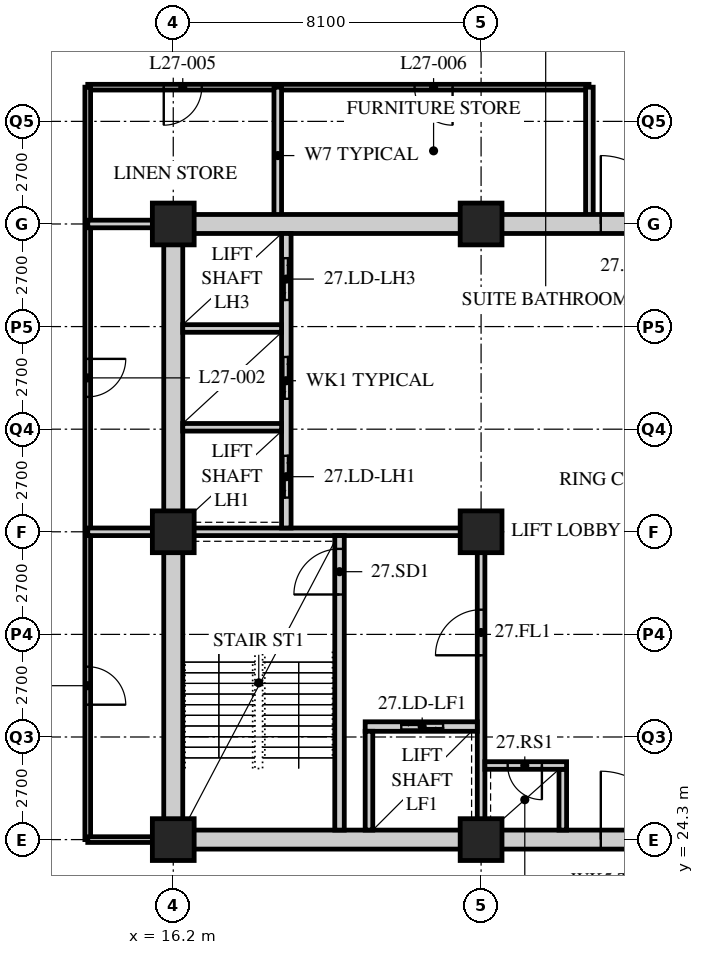
"""IFC4 building model, lengths in metres.
Left out: names, types, materials, properties, quantities, classifications, styles, units other than length and angle.
Written with IfcOpenShell. Run it as: python <this file> out.ifc"""

import sys

from ifc_helpers import new_model, si_unit, direction, frame, frame_2d, origin, origin_2d, place, context, subcontext, project, spatial, rectangle, hollow_rectangle, extrude, element, fill, save


model = new_model("IFC4")
c1 = context("Model", 3, precision=1e-05, world=origin(), true_north=direction((0.0, 1.0)))
c2 = subcontext(c1, "Body", "Model", "MODEL_VIEW")
j1 = project(units=[si_unit("LENGTHUNIT", "METRE"), si_unit("PLANEANGLEUNIT", "RADIAN")], contexts=[c1])
p1 = place(None, origin())
s1 = spatial("IfcSite", under=j1, at=p1, CompositionType="ELEMENT")
p2 = place(p1, origin())
s2 = spatial("IfcBuilding", under=s1, at=p2, CompositionType="ELEMENT")
p3 = place(p2, frame((0.0, 0.0, 110.2)))
s3 = spatial("IfcBuildingStorey", under=s2, at=p3, CompositionType="ELEMENT", Elevation=110.2)
for number, where, z_axis, x_axis in (
    (1, (16.2, 24.3, 0.0), (0.0, 0.0, 1.0), (1.0, 0.0, 0.0)),
    (2, (16.2, 32.4, 0.0), (0.0, 0.0, 1.0), (1.0, 0.0, 0.0)),
    (3, (16.2, 40.5, 0.0), (0.0, 0.0, 1.0), (1.0, 0.0, 0.0)),
    (4, (24.3, 24.3, 0.0), (0.0, 0.0, 1.0), (1.0, 0.0, 0.0)),
    (5, (24.3, 32.4, 0.0), (0.0, 0.0, 1.0), (1.0, 0.0, 0.0)),
    (6, (24.3, 40.5, 0.0), (0.0, 0.0, 1.0), (1.0, 0.0, 0.0)),
):
    element("IfcColumn", number, at=place(p3, frame(where, z_axis=z_axis, x_axis=x_axis)), inside=s3, PredefinedType="COLUMN", context=c2, shape_type="SweptSolid", body=[
        extrude(hollow_rectangle(XDim=1.1, YDim=1.1, WallThickness=0.1, at=origin_2d()), origin(), (0.0, 0.0, 1.0), 3.4),
    ])
p4 = place(p3, frame((27.14, 44.1, 0.0), z_axis=(0.0, 0.0, 1.0), x_axis=(-1.0, 0.0, 0.0)))
e7 = element("IfcWall", 7, at=p4, inside=s3, PredefinedType="PARTITIONING", context=c2, shape_type="SweptSolid", body=[
    extrude(rectangle(XDim=13.19, YDim=0.15, at=frame_2d((6.595, 0.0))), origin(), (0.0, 0.0, 1.0), 3.19),
])
p5 = place(p4, frame((10.19, 0.0, 0.0)))
e8 = element("IfcOpeningElement", 8, at=p5, cuts=e7, PredefinedType="OPENING", context=c2, shape_type="SweptSolid", body=[
    extrude(rectangle(XDim=1.0, YDim=2.1, at=frame_2d((0.5, 1.05))), frame((0.0, 0.085, 0.0), z_axis=(0.0, -1.0, 0.0), x_axis=(1.0, 0.0, 0.0)), (0.0, 0.0, 1.0), 0.17),
])
p6 = place(p4, frame((3.59, 0.0, 0.0)))
e9 = element("IfcOpeningElement", 9, at=p6, cuts=e7, PredefinedType="OPENING", context=c2, shape_type="SweptSolid", body=[
    extrude(rectangle(XDim=1.0, YDim=2.1, at=frame_2d((0.5, 1.05))), frame((0.0, 0.085, 0.0), z_axis=(0.0, -1.0, 0.0), x_axis=(1.0, 0.0, 0.0)), (0.0, 0.0, 1.0), 0.17),
])
p7 = place(p3, frame((13.95, 44.1, 0.0), z_axis=(0.0, 0.0, 1.0), x_axis=(0.0, -1.0, 0.0)))
e10 = element("IfcWall", 10, at=p7, inside=s3, PredefinedType="PARTITIONING", context=c2, shape_type="SweptSolid", body=[
    extrude(rectangle(XDim=19.8, YDim=0.15, at=frame_2d((9.9, 0.0))), origin(), (0.0, 0.0, 1.0), 3.19),
])
p8 = place(p7, frame((15.25, 0.0, 0.0)))
e11 = element("IfcOpeningElement", 11, at=p8, cuts=e10, PredefinedType="OPENING", context=c2, shape_type="SweptSolid", body=[
    extrude(rectangle(XDim=1.0, YDim=2.1, at=frame_2d((0.5, 1.05))), frame((0.0, 0.085, 0.0), z_axis=(0.0, -1.0, 0.0), x_axis=(1.0, 0.0, 0.0)), (0.0, 0.0, 1.0), 0.17),
])
p9 = place(p7, frame((7.15, 0.0, 0.0)))
e12 = element("IfcOpeningElement", 12, at=p9, cuts=e10, PredefinedType="OPENING", context=c2, shape_type="SweptSolid", body=[
    extrude(rectangle(XDim=1.0, YDim=2.1, at=frame_2d((0.5, 1.05))), frame((0.0, 0.085, 0.0), z_axis=(0.0, -1.0, 0.0), x_axis=(1.0, 0.0, 0.0)), (0.0, 0.0, 1.0), 0.17),
])
p10 = place(p3, frame((13.95, 24.3, 0.0), z_axis=(0.0, 0.0, 1.0), x_axis=(1.0, 0.0, 0.0)))
e13 = element("IfcWall", 13, at=p10, inside=s3, PredefinedType="PARTITIONING", context=c2, shape_type="SweptSolid", body=[
    extrude(rectangle(XDim=2.05, YDim=0.15, at=frame_2d((1.025, 0.0))), origin(), (0.0, 0.0, 1.0), 3.19),
])
p11 = place(p3, frame((13.95, 32.4, 0.0), z_axis=(0.0, 0.0, 1.0), x_axis=(1.0, 0.0, 0.0)))
e14 = element("IfcWall", 14, at=p11, inside=s3, PredefinedType="SOLIDWALL", context=c2, shape_type="SweptSolid", body=[
    extrude(rectangle(XDim=2.25, YDim=0.2, at=frame_2d((1.125, 0.0))), origin(), (0.0, 0.0, 1.0), 3.19),
])
for number, where, z_axis, x_axis in (
    (15, (18.95, 44.1, 0.0), (0.0, 0.0, 1.0), (0.0, -1.0, 0.0)),
    (16, (27.15, 40.5, 0.0), (0.0, 0.0, 1.0), (0.0, 1.0, 0.0)),
):
    element("IfcWall", number, at=place(p3, frame(where, z_axis=z_axis, x_axis=x_axis)), inside=s3, PredefinedType="SOLIDWALL", context=c2, shape_type="SweptSolid", body=[
        extrude(rectangle(XDim=3.6, YDim=0.2, at=frame_2d((1.8, 0.0))), origin(), (0.0, 0.0, 1.0), 3.19),
    ])
p12 = place(p3, frame((13.95, 40.5, 0.0), z_axis=(0.0, 0.0, 1.0), x_axis=(1.0, 0.0, 0.0)))
e17 = element("IfcWall", 17, at=p12, inside=s3, PredefinedType="SOLIDWALL", context=c2, shape_type="SweptSolid", body=[
    extrude(rectangle(XDim=2.25, YDim=0.2, at=frame_2d((1.125, 0.0))), origin(), (0.0, 0.0, 1.0), 3.19),
])
p13 = place(p3, frame((15.95, 24.3, 0.0), z_axis=(0.0, 0.0, 1.0), x_axis=(1.0, 0.0, 0.0)))
e18 = element("IfcWall", 18, at=p13, inside=s3, PredefinedType="SOLIDWALL", context=c2, shape_type="SweptSolid", body=[
    extrude(rectangle(XDim=24.8, YDim=0.5, at=frame_2d((12.4, 0.0))), origin(), (0.0, 0.0, 1.0), 2.54),
])
p14 = place(p13, frame((11.5, 0.0, 0.0)))
e19 = element("IfcOpeningElement", 19, at=p14, cuts=e18, PredefinedType="OPENING", context=c2, shape_type="SweptSolid", body=[
    extrude(rectangle(XDim=1.8, YDim=2.4, at=frame_2d((0.9, 1.2))), frame((0.0, 0.26, 0.0), z_axis=(0.0, -1.0, 0.0), x_axis=(1.0, 0.0, 0.0)), (0.0, 0.0, 1.0), 0.52),
])
p15 = place(p3, frame((15.95, 40.5, 0.0), z_axis=(0.0, 0.0, 1.0), x_axis=(1.0, 0.0, 0.0)))
e20 = element("IfcWall", 20, at=p15, inside=s3, PredefinedType="SOLIDWALL", context=c2, shape_type="SweptSolid", body=[
    extrude(rectangle(XDim=24.8, YDim=0.5, at=frame_2d((12.4, 0.0))), origin(), (0.0, 0.0, 1.0), 2.54),
])
p16 = place(p15, frame((11.5, 0.0, 0.0)))
e21 = element("IfcOpeningElement", 21, at=p16, cuts=e20, PredefinedType="OPENING", context=c2, shape_type="SweptSolid", body=[
    extrude(rectangle(XDim=1.8, YDim=2.4, at=frame_2d((0.9, 1.2))), frame((0.0, 0.26, 0.0), z_axis=(0.0, -1.0, 0.0), x_axis=(1.0, 0.0, 0.0)), (0.0, 0.0, 1.0), 0.52),
])
p17 = place(p3, frame((16.2, 24.55, 0.0), z_axis=(0.0, 0.0, 1.0), x_axis=(0.0, 1.0, 0.0)))
e22 = element("IfcWall", 22, at=p17, inside=s3, PredefinedType="SOLIDWALL", context=c2, shape_type="SweptSolid", body=[
    extrude(rectangle(XDim=15.7, YDim=0.5, at=frame_2d((7.85, 0.0))), origin(), (0.0, 0.0, 1.0), 2.578),
])
p18 = place(p3, frame((16.45, 32.4, 0.0), z_axis=(0.0, 0.0, 1.0), x_axis=(1.0, 0.0, 0.0)))
e23 = element("IfcWall", 23, at=p18, inside=s3, PredefinedType="SOLIDWALL", context=c2, shape_type="SweptSolid", body=[
    extrude(rectangle(XDim=7.95, YDim=0.2, at=frame_2d((3.975, 0.0))), origin(), (0.0, 0.0, 1.0), 2.578),
])
p19 = place(p3, frame((24.3, 24.55, 0.0), z_axis=(0.0, 0.0, 1.0), x_axis=(0.0, 1.0, 0.0)))
e24 = element("IfcWall", 24, at=p19, inside=s3, PredefinedType="SOLIDWALL", context=c2, shape_type="SweptSolid", body=[
    extrude(rectangle(XDim=7.75, YDim=0.2, at=frame_2d((3.875, 0.0))), origin(), (0.0, 0.0, 1.0), 2.578),
])
p20 = place(p19, frame((4.6, 0.0, 0.0)))
e25 = element("IfcOpeningElement", 25, at=p20, cuts=e24, PredefinedType="OPENING", context=c2, shape_type="SweptSolid", body=[
    extrude(rectangle(XDim=1.2, YDim=2.1, at=frame_2d((0.6, 1.05))), frame((0.0, 0.11, 0.0), z_axis=(0.0, -1.0, 0.0), x_axis=(1.0, 0.0, 0.0)), (0.0, 0.0, 1.0), 0.22),
])
p21 = place(p3, frame((20.575, 24.55, 0.0), z_axis=(0.0, 0.0, 1.0), x_axis=(0.0, 1.0, 0.0)))
e26 = element("IfcWall", 26, at=p21, inside=s3, PredefinedType="SOLIDWALL", context=c2, shape_type="SweptSolid", body=[
    extrude(rectangle(XDim=7.75, YDim=0.25, at=frame_2d((3.875, 0.0))), origin(), (0.0, 0.0, 1.0), 3.19),
])
p22 = place(p21, frame((6.2, 0.0, 0.0)))
e27 = element("IfcOpeningElement", 27, at=p22, cuts=e26, PredefinedType="OPENING", context=c2, shape_type="SweptSolid", body=[
    extrude(rectangle(XDim=1.2, YDim=2.1, at=frame_2d((0.6, 1.05))), frame((0.0, 0.135, 0.0), z_axis=(0.0, -1.0, 0.0), x_axis=(1.0, 0.0, 0.0)), (0.0, 0.0, 1.0), 0.27),
])
p23 = place(p3, frame((21.25, 27.275, 0.0), z_axis=(0.0, 0.0, 1.0), x_axis=(1.0, 0.0, 0.0)))
e28 = element("IfcWall", 28, at=p23, inside=s3, PredefinedType="SOLIDWALL", context=c2, shape_type="SweptSolid", body=[
    extrude(rectangle(XDim=2.95, YDim=0.25, at=frame_2d((1.475, 0.0))), origin(), (0.0, 0.0, 1.0), 3.19),
])
p24 = place(p23, frame((0.95, 0.0, 0.0)))
e29 = element("IfcOpeningElement", 29, at=p24, cuts=e28, PredefinedType="OPENING", context=c2, shape_type="SweptSolid", body=[
    extrude(rectangle(XDim=1.1, YDim=2.4, at=frame_2d((0.55, 1.2))), frame((0.0, 0.135, 0.0), z_axis=(0.0, -1.0, 0.0), x_axis=(1.0, 0.0, 0.0)), (0.0, 0.0, 1.0), 0.27),
])
p25 = place(p3, frame((21.35, 24.55, 0.0), z_axis=(0.0, 0.0, 1.0), x_axis=(0.0, 1.0, 0.0)))
e30 = element("IfcWall", 30, at=p25, inside=s3, PredefinedType="SOLIDWALL", context=c2, shape_type="SweptSolid", body=[
    extrude(rectangle(XDim=2.6, YDim=0.2, at=frame_2d((1.3, 0.0))), origin(), (0.0, 0.0, 1.0), 3.19),
])
p26 = place(p3, frame((19.175, 32.5, 0.0), z_axis=(0.0, 0.0, 1.0), x_axis=(0.0, 1.0, 0.0)))
e31 = element("IfcWall", 31, at=p26, inside=s3, PredefinedType="SOLIDWALL", context=c2, shape_type="SweptSolid", body=[
    extrude(rectangle(XDim=7.75, YDim=0.25, at=frame_2d((3.875, 0.0))), origin(), (0.0, 0.0, 1.0), 3.19),
])
p27 = place(p26, frame((0.8, 0.0, 0.0)))
e32 = element("IfcOpeningElement", 32, at=p27, cuts=e31, PredefinedType="OPENING", context=c2, shape_type="SweptSolid", body=[
    extrude(rectangle(XDim=1.1, YDim=2.4, at=frame_2d((0.55, 1.2))), frame((0.0, 0.135, 0.0), z_axis=(0.0, -1.0, 0.0), x_axis=(1.0, 0.0, 0.0)), (0.0, 0.0, 1.0), 0.27),
])
p28 = place(p26, frame((3.4, 0.0, 0.0)))
e33 = element("IfcOpeningElement", 33, at=p28, cuts=e31, PredefinedType="OPENING", context=c2, shape_type="SweptSolid", body=[
    extrude(rectangle(XDim=1.1, YDim=2.4, at=frame_2d((0.55, 1.2))), frame((0.0, 0.135, 0.0), z_axis=(0.0, -1.0, 0.0), x_axis=(1.0, 0.0, 0.0)), (0.0, 0.0, 1.0), 0.27),
])
p29 = place(p26, frame((6.0, 0.0, 0.0)))
e34 = element("IfcOpeningElement", 34, at=p29, cuts=e31, PredefinedType="OPENING", context=c2, shape_type="SweptSolid", body=[
    extrude(rectangle(XDim=1.1, YDim=2.4, at=frame_2d((0.55, 1.2))), frame((0.0, 0.135, 0.0), z_axis=(0.0, -1.0, 0.0), x_axis=(1.0, 0.0, 0.0)), (0.0, 0.0, 1.0), 0.27),
])
for number, where, z_axis, x_axis in (
    (35, (16.45, 35.15, 0.0), (0.0, 0.0, 1.0), (1.0, 0.0, 0.0)),
    (36, (16.45, 37.75, 0.0), (0.0, 0.0, 1.0), (1.0, 0.0, 0.0)),
):
    element("IfcWall", number, at=place(p3, frame(where, z_axis=z_axis, x_axis=x_axis)), inside=s3, PredefinedType="SOLIDWALL", context=c2, shape_type="SweptSolid", body=[
        extrude(rectangle(XDim=2.6, YDim=0.2, at=frame_2d((1.3, 0.0))), origin(), (0.0, 0.0, 1.0), 3.19),
    ])
p30 = place(p3, frame((26.45, 24.55, 0.0), z_axis=(0.0, 0.0, 1.0), x_axis=(0.0, 1.0, 0.0)))
e37 = element("IfcWall", 37, at=p30, inside=s3, PredefinedType="SOLIDWALL", context=c2, shape_type="SweptSolid", body=[
    extrude(rectangle(XDim=1.6, YDim=0.2, at=frame_2d((0.8, 0.0))), origin(), (0.0, 0.0, 1.0), 3.19),
])
p31 = place(p3, frame((24.4, 26.25, 0.0), z_axis=(0.0, 0.0, 1.0), x_axis=(1.0, 0.0, 0.0)))
e38 = element("IfcWall", 38, at=p31, inside=s3, PredefinedType="SOLIDWALL", context=c2, shape_type="SweptSolid", body=[
    extrude(rectangle(XDim=2.15, YDim=0.2, at=frame_2d((1.075, 0.0))), origin(), (0.0, 0.0, 1.0), 3.19),
])
p32 = place(p31, frame((0.6, 0.0, 0.0)))
e39 = element("IfcOpeningElement", 39, at=p32, cuts=e38, PredefinedType="OPENING", context=c2, shape_type="SweptSolid", body=[
    extrude(rectangle(XDim=0.9, YDim=2.1, at=frame_2d((0.45, 1.05))), frame((0.0, 0.11, 0.0), z_axis=(0.0, -1.0, 0.0), x_axis=(1.0, 0.0, 0.0)), (0.0, 0.0, 1.0), 0.22),
])
p33 = place(p8, origin())
e40 = element("IfcDoor", 40, at=p33, inside=s3, OperationType="SINGLE_SWING_RIGHT", PredefinedType="DOOR", context=c2, shape_type="SweptSolid", body=[
    extrude(rectangle(XDim=1.0, YDim=2.1, at=frame_2d((0.5, 1.05))), frame((0.0, 0.025, 0.0), z_axis=(0.0, -1.0, 0.0), x_axis=(1.0, 0.0, 0.0)), (0.0, 0.0, 1.0), 0.05),
])
fill(e11, e40)
p34 = place(p9, origin())
e41 = element("IfcDoor", 41, at=p34, inside=s3, OperationType="SINGLE_SWING_LEFT", PredefinedType="DOOR", context=c2, shape_type="SweptSolid", body=[
    extrude(rectangle(XDim=1.0, YDim=2.1, at=frame_2d((0.5, 1.05))), frame((0.0, 0.025, 0.0), z_axis=(0.0, -1.0, 0.0), x_axis=(1.0, 0.0, 0.0)), (0.0, 0.0, 1.0), 0.05),
])
fill(e12, e41)
p35 = place(p5, origin())
e42 = element("IfcDoor", 42, at=p35, inside=s3, OperationType="SINGLE_SWING_RIGHT", PredefinedType="DOOR", context=c2, shape_type="SweptSolid", body=[
    extrude(rectangle(XDim=1.0, YDim=2.1, at=frame_2d((0.5, 1.05))), frame((0.0, 0.025, 0.0), z_axis=(0.0, -1.0, 0.0), x_axis=(1.0, 0.0, 0.0)), (0.0, 0.0, 1.0), 0.05),
])
fill(e8, e42)
p36 = place(p6, origin())
e43 = element("IfcDoor", 43, at=p36, inside=s3, OperationType="SINGLE_SWING_LEFT", PredefinedType="DOOR", context=c2, shape_type="SweptSolid", body=[
    extrude(rectangle(XDim=1.0, YDim=2.1, at=frame_2d((0.5, 1.05))), frame((0.0, 0.025, 0.0), z_axis=(0.0, -1.0, 0.0), x_axis=(1.0, 0.0, 0.0)), (0.0, 0.0, 1.0), 0.05),
])
fill(e9, e43)
p37 = place(p22, origin())
e44 = element("IfcDoor", 44, at=p37, inside=s3, OperationType="SINGLE_SWING_LEFT", PredefinedType="DOOR", context=c2, shape_type="SweptSolid", body=[
    extrude(rectangle(XDim=1.2, YDim=2.1, at=frame_2d((0.6, 1.05))), frame((0.0, 0.025, 0.0), z_axis=(0.0, -1.0, 0.0), x_axis=(1.0, 0.0, 0.0)), (0.0, 0.0, 1.0), 0.05),
])
fill(e27, e44)
p38 = place(p20, origin())
e45 = element("IfcDoor", 45, at=p38, inside=s3, OperationType="SINGLE_SWING_LEFT", PredefinedType="DOOR", context=c2, shape_type="SweptSolid", body=[
    extrude(rectangle(XDim=1.2, YDim=2.1, at=frame_2d((0.6, 1.05))), frame((0.0, 0.025, 0.0), z_axis=(0.0, -1.0, 0.0), x_axis=(1.0, 0.0, 0.0)), (0.0, 0.0, 1.0), 0.05),
])
fill(e25, e45)
p39 = place(p32, origin())
e46 = element("IfcDoor", 46, at=p39, inside=s3, OperationType="SINGLE_SWING_LEFT", PredefinedType="DOOR", context=c2, shape_type="SweptSolid", body=[
    extrude(rectangle(XDim=0.9, YDim=2.1, at=frame_2d((0.45, 1.05))), frame((0.0, 0.025, 0.0), z_axis=(0.0, -1.0, 0.0), x_axis=(1.0, 0.0, 0.0)), (0.0, 0.0, 1.0), 0.05),
])
fill(e39, e46)
p40 = place(p27, origin())
e47 = element("IfcDoor", 47, at=p40, inside=s3, OperationType="DOUBLE_DOOR_SLIDING", PredefinedType="DOOR", context=c2, shape_type="SweptSolid", body=[
    extrude(rectangle(XDim=1.1, YDim=2.4, at=frame_2d((0.55, 1.2))), frame((0.0, 0.025, 0.0), z_axis=(0.0, -1.0, 0.0), x_axis=(1.0, 0.0, 0.0)), (0.0, 0.0, 1.0), 0.05),
])
fill(e32, e47)
p41 = place(p28, origin())
e48 = element("IfcDoor", 48, at=p41, inside=s3, OperationType="DOUBLE_DOOR_SLIDING", PredefinedType="DOOR", context=c2, shape_type="SweptSolid", body=[
    extrude(rectangle(XDim=1.1, YDim=2.4, at=frame_2d((0.55, 1.2))), frame((0.0, 0.025, 0.0), z_axis=(0.0, -1.0, 0.0), x_axis=(1.0, 0.0, 0.0)), (0.0, 0.0, 1.0), 0.05),
])
fill(e33, e48)
p42 = place(p29, origin())
e49 = element("IfcDoor", 49, at=p42, inside=s3, OperationType="DOUBLE_DOOR_SLIDING", PredefinedType="DOOR", context=c2, shape_type="SweptSolid", body=[
    extrude(rectangle(XDim=1.1, YDim=2.4, at=frame_2d((0.55, 1.2))), frame((0.0, 0.025, 0.0), z_axis=(0.0, -1.0, 0.0), x_axis=(1.0, 0.0, 0.0)), (0.0, 0.0, 1.0), 0.05),
])
fill(e34, e49)
p43 = place(p24, origin())
e50 = element("IfcDoor", 50, at=p43, inside=s3, OperationType="DOUBLE_DOOR_SLIDING", PredefinedType="DOOR", context=c2, shape_type="SweptSolid", body=[
    extrude(rectangle(XDim=1.1, YDim=2.4, at=frame_2d((0.55, 1.2))), frame((0.0, 0.025, 0.0), z_axis=(0.0, -1.0, 0.0), x_axis=(1.0, 0.0, 0.0)), (0.0, 0.0, 1.0), 0.05),
])
fill(e29, e50)
p44 = place(p14, origin())
e51 = element("IfcDoor", 51, at=p44, inside=s3, OperationType="DOUBLE_DOOR_SINGLE_SWING", PredefinedType="DOOR", context=c2, shape_type="SweptSolid", body=[
    extrude(rectangle(XDim=1.8, YDim=2.4, at=frame_2d((0.9, 1.2))), frame((0.0, 0.025, 0.0), z_axis=(0.0, -1.0, 0.0), x_axis=(1.0, 0.0, 0.0)), (0.0, 0.0, 1.0), 0.05),
])
fill(e19, e51)
p45 = place(p16, origin())
e52 = element("IfcDoor", 52, at=p45, inside=s3, OperationType="DOUBLE_DOOR_SINGLE_SWING", PredefinedType="DOOR", context=c2, shape_type="SweptSolid", body=[
    extrude(rectangle(XDim=1.8, YDim=2.4, at=frame_2d((0.9, 1.2))), frame((0.0, 0.025, 0.0), z_axis=(0.0, -1.0, 0.0), x_axis=(1.0, 0.0, 0.0)), (0.0, 0.0, 1.0), 0.05),
])
fill(e21, e52)
save(model, sys.argv[1])
